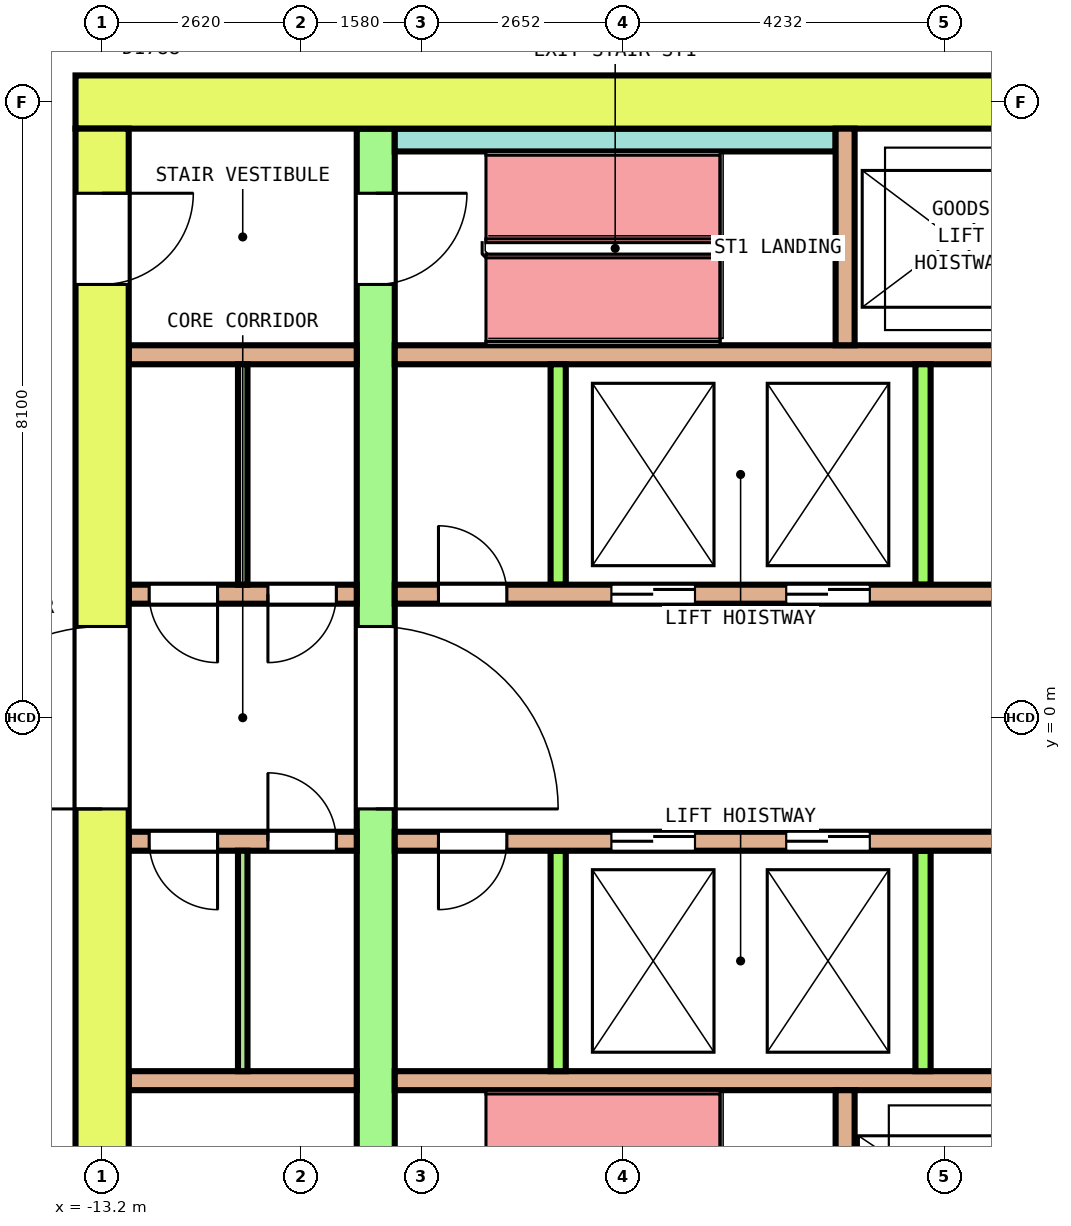
"""IFC4 building model, lengths in metres.
Left out: names, types, materials, properties, quantities, classifications, styles, units other than length and angle.
Written with IfcOpenShell. Run it as: python <this file> out.ifc"""

import sys

from ifc_helpers import new_model, si_unit, direction, frame, frame_2d, origin, place, context, subcontext, project, spatial, rectangle, extrude, element, fill, save


model = new_model("IFC4")
c1 = context("Model", 3, precision=1e-05, world=origin(), true_north=direction((0.0, 1.0)))
c2 = subcontext(c1, "Body", "Model", "MODEL_VIEW")
j1 = project(units=[si_unit("LENGTHUNIT", "METRE"), si_unit("PLANEANGLEUNIT", "RADIAN")], contexts=[c1])
p1 = place(None, origin())
s1 = spatial("IfcSite", under=j1, at=p1, CompositionType="ELEMENT")
p2 = place(p1, origin())
s2 = spatial("IfcBuilding", under=s1, at=p2, CompositionType="ELEMENT")
p3 = place(p2, frame((0.0, 0.0, 167.2)))
s3 = spatial("IfcBuildingStorey", under=s2, at=p3, CompositionType="ELEMENT", Elevation=167.2)
p4 = place(p3, frame((-13.55, 8.1, 0.0), z_axis=(0.0, 0.0, 1.0), x_axis=(1.0, 0.0, 0.0)))
e1 = element("IfcWall", 1, at=p4, inside=s3, PredefinedType="SHEAR", context=c2, shape_type="SweptSolid", body=[
    extrude(rectangle(XDim=27.1, YDim=0.7, at=frame_2d((13.55, 0.0))), origin(), (0.0, 0.0, 1.0), 4.1),
])
p5 = place(p4, frame((14.475, 0.0, 0.0)))
e2 = element("IfcOpeningElement", 2, at=p5, cuts=e1, PredefinedType="OPENING", context=c2, shape_type="SweptSolid", body=[
    extrude(rectangle(XDim=1.4, YDim=2.1, at=frame_2d((0.7, 1.05))), frame((0.0, 0.36, 0.0), z_axis=(0.0, -1.0, 0.0), x_axis=(1.0, 0.0, 0.0)), (0.0, 0.0, 1.0), 0.72),
])
p6 = place(p3, frame((-13.2, -7.75, 0.0), z_axis=(0.0, 0.0, 1.0), x_axis=(0.0, 1.0, 0.0)))
e3 = element("IfcWall", 3, at=p6, inside=s3, PredefinedType="SHEAR", context=c2, shape_type="SweptSolid", body=[
    extrude(rectangle(XDim=15.5, YDim=0.7, at=frame_2d((7.75, 0.0))), origin(), (0.0, 0.0, 1.0), 4.1),
])
p7 = place(p6, frame((6.55, 0.0, 0.0)))
e4 = element("IfcOpeningElement", 4, at=p7, cuts=e3, PredefinedType="OPENING", context=c2, shape_type="SweptSolid", body=[
    extrude(rectangle(XDim=2.4, YDim=2.1, at=frame_2d((1.2, 1.05))), frame((0.0, 0.36, 0.0), z_axis=(0.0, -1.0, 0.0), x_axis=(1.0, 0.0, 0.0)), (0.0, 0.0, 1.0), 0.72),
])
p8 = place(p6, frame((13.45, 0.0, 0.0)))
e5 = element("IfcOpeningElement", 5, at=p8, cuts=e3, PredefinedType="OPENING", context=c2, shape_type="SweptSolid", body=[
    extrude(rectangle(XDim=1.2, YDim=2.1, at=frame_2d((0.6, 1.05))), frame((0.0, 0.36, 0.0), z_axis=(0.0, -1.0, 0.0), x_axis=(1.0, 0.0, 0.0)), (0.0, 0.0, 1.0), 0.72),
])
p9 = place(p6, frame((0.85, 0.0, 0.0)))
e6 = element("IfcOpeningElement", 6, at=p9, cuts=e3, PredefinedType="OPENING", context=c2, shape_type="SweptSolid", body=[
    extrude(rectangle(XDim=1.2, YDim=2.1, at=frame_2d((0.6, 1.05))), frame((0.0, 0.36, 0.0), z_axis=(0.0, -1.0, 0.0), x_axis=(1.0, 0.0, 0.0)), (0.0, 0.0, 1.0), 0.72),
])
p10 = place(p3, frame((-9.6, -7.75, 0.0), z_axis=(0.0, 0.0, 1.0), x_axis=(0.0, 1.0, 0.0)))
e7 = element("IfcWall", 7, at=p10, inside=s3, PredefinedType="SHEAR", context=c2, shape_type="SweptSolid", body=[
    extrude(rectangle(XDim=15.5, YDim=0.5, at=frame_2d((7.75, 0.0))), origin(), (0.0, 0.0, 1.0), 4.1),
])
p11 = place(p10, frame((6.55, 0.0, 0.0)))
e8 = element("IfcOpeningElement", 8, at=p11, cuts=e7, PredefinedType="OPENING", context=c2, shape_type="SweptSolid", body=[
    extrude(rectangle(XDim=2.4, YDim=2.1, at=frame_2d((1.2, 1.05))), frame((0.0, 0.26, 0.0), z_axis=(0.0, -1.0, 0.0), x_axis=(1.0, 0.0, 0.0)), (0.0, 0.0, 1.0), 0.52),
])
p12 = place(p10, frame((13.45, 0.0, 0.0)))
e9 = element("IfcOpeningElement", 9, at=p12, cuts=e7, PredefinedType="OPENING", context=c2, shape_type="SweptSolid", body=[
    extrude(rectangle(XDim=1.2, YDim=2.1, at=frame_2d((0.6, 1.05))), frame((0.0, 0.26, 0.0), z_axis=(0.0, -1.0, 0.0), x_axis=(1.0, 0.0, 0.0)), (0.0, 0.0, 1.0), 0.52),
])
p13 = place(p10, frame((0.85, 0.0, 0.0)))
e10 = element("IfcOpeningElement", 10, at=p13, cuts=e7, PredefinedType="OPENING", context=c2, shape_type="SweptSolid", body=[
    extrude(rectangle(XDim=1.2, YDim=2.1, at=frame_2d((0.6, 1.05))), frame((0.0, 0.26, 0.0), z_axis=(0.0, -1.0, 0.0), x_axis=(1.0, 0.0, 0.0)), (0.0, 0.0, 1.0), 0.52),
])
p14 = place(p3, frame((-12.85, 1.625, 0.0), z_axis=(0.0, 0.0, 1.0), x_axis=(1.0, 0.0, 0.0)))
e11 = element("IfcWall", 11, at=p14, inside=s3, PredefinedType="SOLIDWALL", context=c2, shape_type="SweptSolid", body=[
    extrude(rectangle(XDim=3.0, YDim=0.25, at=frame_2d((1.5, 0.0))), origin(), (0.0, 0.0, 1.0), 4.1),
])
p15 = place(p14, frame((0.269, 0.0, 0.0)))
e12 = element("IfcOpeningElement", 12, at=p15, cuts=e11, PredefinedType="OPENING", context=c2, shape_type="SweptSolid", body=[
    extrude(rectangle(XDim=0.9, YDim=2.1, at=frame_2d((0.45, 1.05))), frame((0.0, 0.135, 0.0), z_axis=(0.0, -1.0, 0.0), x_axis=(1.0, 0.0, 0.0)), (0.0, 0.0, 1.0), 0.27),
])
p16 = place(p14, frame((1.831, 0.0, 0.0)))
e13 = element("IfcOpeningElement", 13, at=p16, cuts=e11, PredefinedType="OPENING", context=c2, shape_type="SweptSolid", body=[
    extrude(rectangle(XDim=0.9, YDim=2.1, at=frame_2d((0.45, 1.05))), frame((0.0, 0.135, 0.0), z_axis=(0.0, -1.0, 0.0), x_axis=(1.0, 0.0, 0.0)), (0.0, 0.0, 1.0), 0.27),
])
p17 = place(p3, frame((-9.35, 1.625, 0.0), z_axis=(0.0, 0.0, 1.0), x_axis=(1.0, 0.0, 0.0)))
e14 = element("IfcWall", 14, at=p17, inside=s3, PredefinedType="SOLIDWALL", context=c2, shape_type="SweptSolid", body=[
    extrude(rectangle(XDim=18.7, YDim=0.25, at=frame_2d((9.35, 0.0))), origin(), (0.0, 0.0, 1.0), 4.1),
])
p18 = place(p17, frame((2.85, 0.0, 0.0)))
e15 = element("IfcOpeningElement", 15, at=p18, cuts=e14, PredefinedType="OPENING", context=c2, shape_type="SweptSolid", body=[
    extrude(rectangle(XDim=1.1, YDim=2.1, at=frame_2d((0.55, 1.05))), frame((0.0, 0.135, 0.0), z_axis=(0.0, -1.0, 0.0), x_axis=(1.0, 0.0, 0.0)), (0.0, 0.0, 1.0), 0.27),
])
p19 = place(p17, frame((5.15, 0.0, 0.0)))
e16 = element("IfcOpeningElement", 16, at=p19, cuts=e14, PredefinedType="OPENING", context=c2, shape_type="SweptSolid", body=[
    extrude(rectangle(XDim=1.1, YDim=2.1, at=frame_2d((0.55, 1.05))), frame((0.0, 0.135, 0.0), z_axis=(0.0, -1.0, 0.0), x_axis=(1.0, 0.0, 0.0)), (0.0, 0.0, 1.0), 0.27),
])
p20 = place(p17, frame((14.8, 0.0, 0.0)))
e17 = element("IfcOpeningElement", 17, at=p20, cuts=e14, PredefinedType="OPENING", context=c2, shape_type="SweptSolid", body=[
    extrude(rectangle(XDim=1.1, YDim=2.1, at=frame_2d((0.55, 1.05))), frame((0.0, 0.135, 0.0), z_axis=(0.0, -1.0, 0.0), x_axis=(1.0, 0.0, 0.0)), (0.0, 0.0, 1.0), 0.27),
])
p21 = place(p17, frame((0.575, 0.0, 0.0)))
e18 = element("IfcOpeningElement", 18, at=p21, cuts=e14, PredefinedType="OPENING", context=c2, shape_type="SweptSolid", body=[
    extrude(rectangle(XDim=0.9, YDim=2.1, at=frame_2d((0.45, 1.05))), frame((0.0, 0.135, 0.0), z_axis=(0.0, -1.0, 0.0), x_axis=(1.0, 0.0, 0.0)), (0.0, 0.0, 1.0), 0.27),
])
p22 = place(p17, frame((17.225, 0.0, 0.0)))
e19 = element("IfcOpeningElement", 19, at=p22, cuts=e14, PredefinedType="OPENING", context=c2, shape_type="SweptSolid", body=[
    extrude(rectangle(XDim=0.9, YDim=2.1, at=frame_2d((0.45, 1.05))), frame((0.0, 0.135, 0.0), z_axis=(0.0, -1.0, 0.0), x_axis=(1.0, 0.0, 0.0)), (0.0, 0.0, 1.0), 0.27),
])
p23 = place(p3, frame((-12.85, 4.775, 0.0), z_axis=(0.0, 0.0, 1.0), x_axis=(1.0, 0.0, 0.0)))
e20 = element("IfcWall", 20, at=p23, inside=s3, PredefinedType="SOLIDWALL", context=c2, shape_type="SweptSolid", body=[
    extrude(rectangle(XDim=3.0, YDim=0.25, at=frame_2d((1.5, 0.0))), origin(), (0.0, 0.0, 1.0), 4.1),
])
p24 = place(p3, frame((-9.35, 4.775, 0.0), z_axis=(0.0, 0.0, 1.0), x_axis=(1.0, 0.0, 0.0)))
e21 = element("IfcWall", 21, at=p24, inside=s3, PredefinedType="SOLIDWALL", context=c2, shape_type="SweptSolid", body=[
    extrude(rectangle(XDim=18.7, YDim=0.25, at=frame_2d((9.35, 0.0))), origin(), (0.0, 0.0, 1.0), 4.1),
])
for number, where, z_axis, x_axis in (
    (22, (-7.2, 1.75, 0.0), (0.0, 0.0, 1.0), (0.0, 1.0, 0.0)),
    (23, (-2.4, 1.75, 0.0), (0.0, 0.0, 1.0), (0.0, 1.0, 0.0)),
):
    element("IfcWall", number, at=place(p3, frame(where, z_axis=z_axis, x_axis=x_axis)), inside=s3, PredefinedType="SOLIDWALL", context=c2, shape_type="SweptSolid", body=[
        extrude(rectangle(XDim=2.9, YDim=0.2, at=frame_2d((1.45, 0.0))), origin(), (0.0, 0.0, 1.0), 4.1),
    ])
p25 = place(p3, frame((-12.85, -1.625, 0.0), z_axis=(0.0, 0.0, 1.0), x_axis=(1.0, 0.0, 0.0)))
e24 = element("IfcWall", 24, at=p25, inside=s3, PredefinedType="SOLIDWALL", context=c2, shape_type="SweptSolid", body=[
    extrude(rectangle(XDim=3.0, YDim=0.25, at=frame_2d((1.5, 0.0))), origin(), (0.0, 0.0, 1.0), 4.1),
])
p26 = place(p25, frame((0.269, 0.0, 0.0)))
e25 = element("IfcOpeningElement", 25, at=p26, cuts=e24, PredefinedType="OPENING", context=c2, shape_type="SweptSolid", body=[
    extrude(rectangle(XDim=0.9, YDim=2.1, at=frame_2d((0.45, 1.05))), frame((0.0, 0.135, 0.0), z_axis=(0.0, -1.0, 0.0), x_axis=(1.0, 0.0, 0.0)), (0.0, 0.0, 1.0), 0.27),
])
p27 = place(p25, frame((1.831, 0.0, 0.0)))
e26 = element("IfcOpeningElement", 26, at=p27, cuts=e24, PredefinedType="OPENING", context=c2, shape_type="SweptSolid", body=[
    extrude(rectangle(XDim=0.9, YDim=2.1, at=frame_2d((0.45, 1.05))), frame((0.0, 0.135, 0.0), z_axis=(0.0, -1.0, 0.0), x_axis=(1.0, 0.0, 0.0)), (0.0, 0.0, 1.0), 0.27),
])
p28 = place(p3, frame((-9.35, -1.625, 0.0), z_axis=(0.0, 0.0, 1.0), x_axis=(1.0, 0.0, 0.0)))
e27 = element("IfcWall", 27, at=p28, inside=s3, PredefinedType="SOLIDWALL", context=c2, shape_type="SweptSolid", body=[
    extrude(rectangle(XDim=18.7, YDim=0.25, at=frame_2d((9.35, 0.0))), origin(), (0.0, 0.0, 1.0), 4.1),
])
p29 = place(p28, frame((2.85, 0.0, 0.0)))
e28 = element("IfcOpeningElement", 28, at=p29, cuts=e27, PredefinedType="OPENING", context=c2, shape_type="SweptSolid", body=[
    extrude(rectangle(XDim=1.1, YDim=2.1, at=frame_2d((0.55, 1.05))), frame((0.0, 0.135, 0.0), z_axis=(0.0, -1.0, 0.0), x_axis=(1.0, 0.0, 0.0)), (0.0, 0.0, 1.0), 0.27),
])
p30 = place(p28, frame((5.15, 0.0, 0.0)))
e29 = element("IfcOpeningElement", 29, at=p30, cuts=e27, PredefinedType="OPENING", context=c2, shape_type="SweptSolid", body=[
    extrude(rectangle(XDim=1.1, YDim=2.1, at=frame_2d((0.55, 1.05))), frame((0.0, 0.135, 0.0), z_axis=(0.0, -1.0, 0.0), x_axis=(1.0, 0.0, 0.0)), (0.0, 0.0, 1.0), 0.27),
])
p31 = place(p28, frame((14.8, 0.0, 0.0)))
e30 = element("IfcOpeningElement", 30, at=p31, cuts=e27, PredefinedType="OPENING", context=c2, shape_type="SweptSolid", body=[
    extrude(rectangle(XDim=1.1, YDim=2.1, at=frame_2d((0.55, 1.05))), frame((0.0, 0.135, 0.0), z_axis=(0.0, -1.0, 0.0), x_axis=(1.0, 0.0, 0.0)), (0.0, 0.0, 1.0), 0.27),
])
p32 = place(p28, frame((0.575, 0.0, 0.0)))
e31 = element("IfcOpeningElement", 31, at=p32, cuts=e27, PredefinedType="OPENING", context=c2, shape_type="SweptSolid", body=[
    extrude(rectangle(XDim=0.9, YDim=2.1, at=frame_2d((0.45, 1.05))), frame((0.0, 0.135, 0.0), z_axis=(0.0, -1.0, 0.0), x_axis=(1.0, 0.0, 0.0)), (0.0, 0.0, 1.0), 0.27),
])
p33 = place(p28, frame((17.225, 0.0, 0.0)))
e32 = element("IfcOpeningElement", 32, at=p33, cuts=e27, PredefinedType="OPENING", context=c2, shape_type="SweptSolid", body=[
    extrude(rectangle(XDim=0.9, YDim=2.1, at=frame_2d((0.45, 1.05))), frame((0.0, 0.135, 0.0), z_axis=(0.0, -1.0, 0.0), x_axis=(1.0, 0.0, 0.0)), (0.0, 0.0, 1.0), 0.27),
])
p34 = place(p3, frame((-12.85, -4.775, 0.0), z_axis=(0.0, 0.0, 1.0), x_axis=(1.0, 0.0, 0.0)))
e33 = element("IfcWall", 33, at=p34, inside=s3, PredefinedType="SOLIDWALL", context=c2, shape_type="SweptSolid", body=[
    extrude(rectangle(XDim=3.0, YDim=0.25, at=frame_2d((1.5, 0.0))), origin(), (0.0, 0.0, 1.0), 4.1),
])
p35 = place(p3, frame((-9.35, -4.775, 0.0), z_axis=(0.0, 0.0, 1.0), x_axis=(1.0, 0.0, 0.0)))
e34 = element("IfcWall", 34, at=p35, inside=s3, PredefinedType="SOLIDWALL", context=c2, shape_type="SweptSolid", body=[
    extrude(rectangle(XDim=18.7, YDim=0.25, at=frame_2d((9.35, 0.0))), origin(), (0.0, 0.0, 1.0), 4.1),
])
for number, where, z_axis, x_axis in (
    (35, (-7.2, -4.65, 0.0), (0.0, 0.0, 1.0), (0.0, 1.0, 0.0)),
    (36, (-2.4, -4.65, 0.0), (0.0, 0.0, 1.0), (0.0, 1.0, 0.0)),
):
    element("IfcWall", number, at=place(p3, frame(where, z_axis=z_axis, x_axis=x_axis)), inside=s3, PredefinedType="SOLIDWALL", context=c2, shape_type="SweptSolid", body=[
        extrude(rectangle(XDim=2.9, YDim=0.2, at=frame_2d((1.45, 0.0))), origin(), (0.0, 0.0, 1.0), 4.1),
    ])
p36 = place(p3, frame((-9.35, 7.6, 0.0), z_axis=(0.0, 0.0, 1.0), x_axis=(1.0, 0.0, 0.0)))
e37 = element("IfcWall", 37, at=p36, inside=s3, PredefinedType="SOLIDWALL", context=c2, shape_type="SweptSolid", body=[
    extrude(rectangle(XDim=5.8, YDim=0.3, at=frame_2d((2.9, 0.0))), origin(), (0.0, 0.0, 1.0), 4.1),
])
for number, where, z_axis, x_axis in (
    (38, (-3.425, 4.9, 0.0), (0.0, 0.0, 1.0), (0.0, 1.0, 0.0)),
    (39, (-3.425, -7.75, 0.0), (0.0, 0.0, 1.0), (0.0, 1.0, 0.0)),
):
    element("IfcWall", number, at=place(p3, frame(where, z_axis=z_axis, x_axis=x_axis)), inside=s3, PredefinedType="SOLIDWALL", context=c2, shape_type="SweptSolid", body=[
        extrude(rectangle(XDim=2.85, YDim=0.25, at=frame_2d((1.425, 0.0))), origin(), (0.0, 0.0, 1.0), 4.1),
    ])
for number, where, z_axis, x_axis in (
    (40, (-11.35, 1.75, 0.0), (0.0, 0.0, 1.0), (0.0, 1.0, 0.0)),
    (41, (-11.35, -4.65, 0.0), (0.0, 0.0, 1.0), (0.0, 1.0, 0.0)),
):
    element("IfcWall", number, at=place(p3, frame(where, z_axis=z_axis, x_axis=x_axis)), inside=s3, PredefinedType="PARTITIONING", context=c2, shape_type="SweptSolid", body=[
        extrude(rectangle(XDim=2.9, YDim=0.125, at=frame_2d((1.45, 0.0))), origin(), (0.0, 0.0, 1.0), 4.1),
    ])
p37 = place(p18, origin())
e42 = element("IfcDoor", 42, at=p37, inside=s3, OperationType="DOUBLE_DOOR_SLIDING", PredefinedType="DOOR", context=c2, shape_type="SweptSolid", body=[
    extrude(rectangle(XDim=1.1, YDim=2.1, at=frame_2d((0.55, 1.05))), frame((0.0, 0.075, 0.0), z_axis=(0.0, -1.0, 0.0), x_axis=(1.0, 0.0, 0.0)), (0.0, 0.0, 1.0), 0.15),
])
fill(e15, e42)
p38 = place(p19, origin())
e43 = element("IfcDoor", 43, at=p38, inside=s3, OperationType="DOUBLE_DOOR_SLIDING", PredefinedType="DOOR", context=c2, shape_type="SweptSolid", body=[
    extrude(rectangle(XDim=1.1, YDim=2.1, at=frame_2d((0.55, 1.05))), frame((0.0, 0.075, 0.0), z_axis=(0.0, -1.0, 0.0), x_axis=(1.0, 0.0, 0.0)), (0.0, 0.0, 1.0), 0.15),
])
fill(e16, e43)
p39 = place(p29, origin())
e44 = element("IfcDoor", 44, at=p39, inside=s3, OperationType="DOUBLE_DOOR_SLIDING", PredefinedType="DOOR", context=c2, shape_type="SweptSolid", body=[
    extrude(rectangle(XDim=1.1, YDim=2.1, at=frame_2d((0.55, 1.05))), frame((0.0, 0.075, 0.0), z_axis=(0.0, -1.0, 0.0), x_axis=(1.0, 0.0, 0.0)), (0.0, 0.0, 1.0), 0.15),
])
fill(e28, e44)
p40 = place(p30, origin())
e45 = element("IfcDoor", 45, at=p40, inside=s3, OperationType="DOUBLE_DOOR_SLIDING", PredefinedType="DOOR", context=c2, shape_type="SweptSolid", body=[
    extrude(rectangle(XDim=1.1, YDim=2.1, at=frame_2d((0.55, 1.05))), frame((0.0, 0.075, 0.0), z_axis=(0.0, -1.0, 0.0), x_axis=(1.0, 0.0, 0.0)), (0.0, 0.0, 1.0), 0.15),
])
fill(e29, e45)
p41 = place(p11, origin())
e46 = element("IfcDoor", 46, at=p41, inside=s3, OperationType="DOUBLE_DOOR_SINGLE_SWING", PredefinedType="DOOR", context=c2, shape_type="SweptSolid", body=[
    extrude(rectangle(XDim=2.4, YDim=2.1, at=frame_2d((1.2, 1.05))), frame((0.0, 0.2, 0.0), z_axis=(0.0, -1.0, 0.0), x_axis=(1.0, 0.0, 0.0)), (0.0, 0.0, 1.0), 0.4),
])
fill(e8, e46)
p42 = place(p7, origin())
e47 = element("IfcDoor", 47, at=p42, inside=s3, OperationType="DOUBLE_DOOR_SINGLE_SWING", PredefinedType="DOOR", context=c2, shape_type="SweptSolid", body=[
    extrude(rectangle(XDim=2.4, YDim=2.1, at=frame_2d((1.2, 1.05))), frame((0.0, 0.3, 0.0), z_axis=(0.0, -1.0, 0.0), x_axis=(1.0, 0.0, 0.0)), (0.0, 0.0, 1.0), 0.6),
])
fill(e4, e47)
p43 = place(p12, origin())
e48 = element("IfcDoor", 48, at=p43, inside=s3, OperationType="SINGLE_SWING_LEFT", PredefinedType="DOOR", context=c2, shape_type="SweptSolid", body=[
    extrude(rectangle(XDim=1.2, YDim=2.1, at=frame_2d((0.6, 1.05))), frame((0.0, 0.2, 0.0), z_axis=(0.0, -1.0, 0.0), x_axis=(1.0, 0.0, 0.0)), (0.0, 0.0, 1.0), 0.4),
])
fill(e9, e48)
p44 = place(p8, origin())
e49 = element("IfcDoor", 49, at=p44, inside=s3, OperationType="SINGLE_SWING_RIGHT", PredefinedType="DOOR", context=c2, shape_type="SweptSolid", body=[
    extrude(rectangle(XDim=1.2, YDim=2.1, at=frame_2d((0.6, 1.05))), frame((0.0, 0.3, 0.0), z_axis=(0.0, -1.0, 0.0), x_axis=(1.0, 0.0, 0.0)), (0.0, 0.0, 1.0), 0.6),
])
fill(e5, e49)
p45 = place(p15, origin())
e50 = element("IfcDoor", 50, at=p45, inside=s3, OperationType="SINGLE_SWING_LEFT", PredefinedType="DOOR", context=c2, shape_type="SweptSolid", body=[
    extrude(rectangle(XDim=0.9, YDim=2.1, at=frame_2d((0.45, 1.05))), frame((0.0, 0.075, 0.0), z_axis=(0.0, -1.0, 0.0), x_axis=(1.0, 0.0, 0.0)), (0.0, 0.0, 1.0), 0.15),
])
fill(e12, e50)
p46 = place(p16, origin())
e51 = element("IfcDoor", 51, at=p46, inside=s3, OperationType="SINGLE_SWING_RIGHT", PredefinedType="DOOR", context=c2, shape_type="SweptSolid", body=[
    extrude(rectangle(XDim=0.9, YDim=2.1, at=frame_2d((0.45, 1.05))), frame((0.0, 0.075, 0.0), z_axis=(0.0, -1.0, 0.0), x_axis=(1.0, 0.0, 0.0)), (0.0, 0.0, 1.0), 0.15),
])
fill(e13, e51)
p47 = place(p21, origin())
e52 = element("IfcDoor", 52, at=p47, inside=s3, OperationType="SINGLE_SWING_LEFT", PredefinedType="DOOR", context=c2, shape_type="SweptSolid", body=[
    extrude(rectangle(XDim=0.9, YDim=2.1, at=frame_2d((0.45, 1.05))), frame((0.0, 0.075, 0.0), z_axis=(0.0, -1.0, 0.0), x_axis=(1.0, 0.0, 0.0)), (0.0, 0.0, 1.0), 0.15),
])
fill(e18, e52)
p48 = place(p26, origin())
e53 = element("IfcDoor", 53, at=p48, inside=s3, OperationType="SINGLE_SWING_LEFT", PredefinedType="DOOR", context=c2, shape_type="SweptSolid", body=[
    extrude(rectangle(XDim=0.9, YDim=2.1, at=frame_2d((0.45, 1.05))), frame((0.0, 0.075, 0.0), z_axis=(0.0, -1.0, 0.0), x_axis=(1.0, 0.0, 0.0)), (0.0, 0.0, 1.0), 0.15),
])
fill(e25, e53)
p49 = place(p27, origin())
e54 = element("IfcDoor", 54, at=p49, inside=s3, OperationType="SINGLE_SWING_RIGHT", PredefinedType="DOOR", context=c2, shape_type="SweptSolid", body=[
    extrude(rectangle(XDim=0.9, YDim=2.1, at=frame_2d((0.45, 1.05))), frame((0.0, 0.075, 0.0), z_axis=(0.0, -1.0, 0.0), x_axis=(1.0, 0.0, 0.0)), (0.0, 0.0, 1.0), 0.15),
])
fill(e26, e54)
p50 = place(p32, origin())
e55 = element("IfcDoor", 55, at=p50, inside=s3, OperationType="SINGLE_SWING_LEFT", PredefinedType="DOOR", context=c2, shape_type="SweptSolid", body=[
    extrude(rectangle(XDim=0.9, YDim=2.1, at=frame_2d((0.45, 1.05))), frame((0.0, 0.075, 0.0), z_axis=(0.0, -1.0, 0.0), x_axis=(1.0, 0.0, 0.0)), (0.0, 0.0, 1.0), 0.15),
])
fill(e31, e55)
save(model, sys.argv[1])
